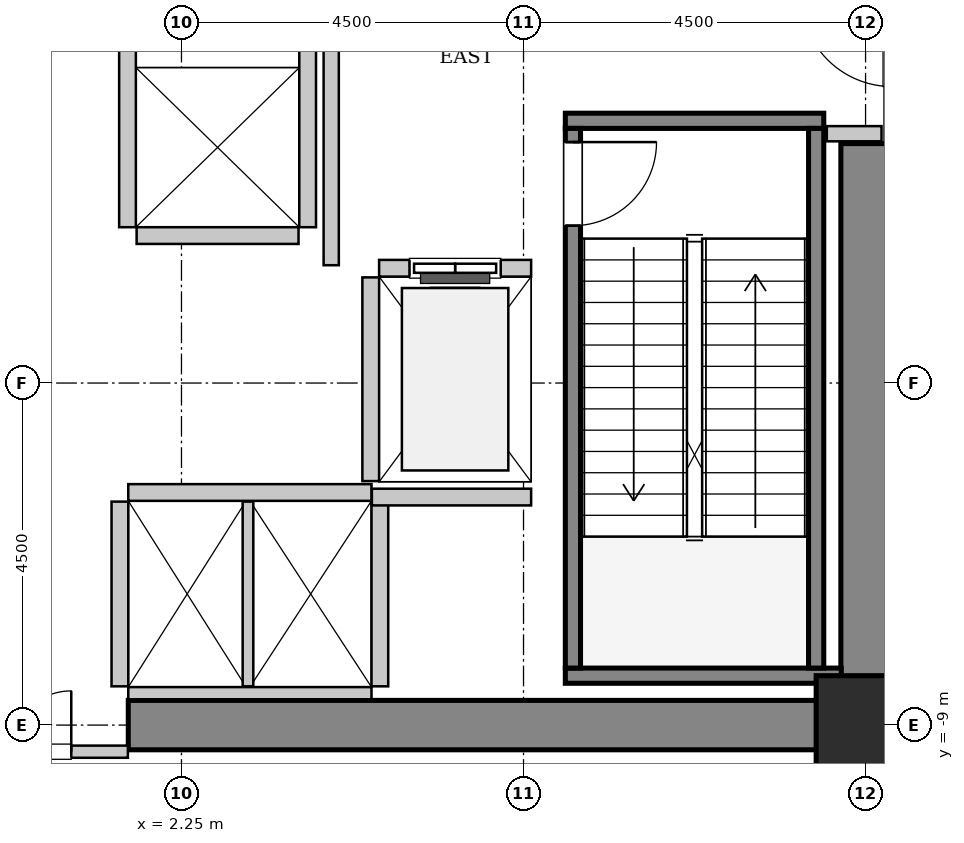
"""IFC4 building model, lengths in metres.
Left out: names, types, materials, properties, quantities, classifications, styles, units other than length and angle.
Written with IfcOpenShell. Run it as: python <this file> out.ifc"""

import sys

from ifc_helpers import new_model, si_unit, direction, frame, frame_2d, origin, origin_2d, place, context, subcontext, project, spatial, rectangle, hollow_rectangle, extrude, source, transform, mapped, element, fill, save


model = new_model("IFC4")
c1 = context("Model", 3, precision=1e-05, world=origin(), true_north=direction((0.0, 1.0)))
c2 = subcontext(c1, "Body", "Model", "MODEL_VIEW")
j1 = project(units=[si_unit("LENGTHUNIT", "METRE"), si_unit("PLANEANGLEUNIT", "RADIAN")], contexts=[c1])
p1 = place(None, origin())
s1 = spatial("IfcSite", under=j1, at=p1, CompositionType="ELEMENT")
p2 = place(p1, origin())
s2 = spatial("IfcBuilding", under=s1, at=p2, CompositionType="ELEMENT")
p3 = place(p2, frame((0.0, 0.0, 22.2)))
s3 = spatial("IfcBuildingStorey", under=s2, at=p3, CompositionType="ELEMENT", Elevation=22.2)
m1 = source(origin(), c2, "Body", "SweptSolid", [
    extrude(rectangle(XDim=10.025, YDim=0.65, at=frame_2d((5.012, 0.0))), origin(), (0.0, 0.0, 1.0), 5.4),
])
p4 = place(p3, frame((1.55, -9.0, 0.0), z_axis=(0.0, 0.0, 1.0), x_axis=(1.0, 0.0, 0.0)))
e1 = element("IfcWall", 1, at=p4, inside=s3, PredefinedType="SHEAR", context=c2, shape_type="MappedRepresentation", body=[
    mapped(m1, transform((0.0, 0.0, 0.0), x_axis=(1.0, 0.0, 0.0), y_axis=(0.0, 1.0, 0.0), z_axis=(0.0, 0.0, 1.0), scale=1.0)),
])
m2 = source(origin(), c2, "Body", "SweptSolid", [
    extrude(rectangle(XDim=7.325, YDim=0.65, at=frame_2d((3.663, 0.0))), origin(), (0.0, 0.0, 1.0), 5.4),
])
p5 = place(p3, frame((11.25, -8.675, 0.0), z_axis=(0.0, 0.0, 1.0), x_axis=(0.0, 1.0, 0.0)))
e2 = element("IfcWall", 2, at=p5, inside=s3, PredefinedType="SHEAR", context=c2, shape_type="MappedRepresentation", body=[
    mapped(m2, transform((0.0, 0.0, 0.0), x_axis=(1.0, 0.0, 0.0), y_axis=(0.0, 1.0, 0.0), z_axis=(0.0, 0.0, 1.0), scale=1.0)),
])
m3 = source(origin(), c2, "Body", "SweptSolid", [
    extrude(hollow_rectangle(XDim=1.3, YDim=1.3, WallThickness=0.065, InnerFilletRadius=0.065, OuterFilletRadius=0.13, at=origin_2d()), origin(), (0.0, 0.0, 1.0), 5.4),
])
p6 = place(p3, frame((11.25, -9.0, 0.0), z_axis=(0.0, 0.0, 1.0), x_axis=(1.0, 0.0, 0.0)))
e3 = element("IfcColumn", 3, at=p6, inside=s3, PredefinedType="COLUMN", context=c2, shape_type="MappedRepresentation", body=[
    mapped(m3, transform((0.0, 0.0, 0.0), x_axis=(1.0, 0.0, 0.0), y_axis=(0.0, 1.0, 0.0), z_axis=(0.0, 0.0, 1.0), scale=1.0)),
])
m4 = source(origin(), c2, "Body", "SweptSolid", [
    extrude(rectangle(XDim=3.4, YDim=0.2, at=frame_2d((1.7, 0.0))), origin(), (0.0, 0.0, 1.0), 5.4),
])
p7 = place(p3, frame((7.3, -1.05, 0.0), z_axis=(0.0, 0.0, 1.0), x_axis=(1.0, 0.0, 0.0)))
e4 = element("IfcWall", 4, at=p7, inside=s3, PredefinedType="SOLIDWALL", context=c2, shape_type="MappedRepresentation", body=[
    mapped(m4, transform((0.0, 0.0, 0.0), x_axis=(1.0, 0.0, 0.0), y_axis=(0.0, 1.0, 0.0), z_axis=(0.0, 0.0, 1.0), scale=1.0)),
])
m5 = source(origin(), c2, "Body", "SweptSolid", [
    extrude(rectangle(XDim=3.63, YDim=0.2, at=frame_2d((1.815, 0.0))), origin(), (0.0, 0.0, 1.0), 5.4),
])
p8 = place(p3, frame((7.3, -8.35, 0.0), z_axis=(0.0, 0.0, 1.0), x_axis=(1.0, 0.0, 0.0)))
e5 = element("IfcWall", 5, at=p8, inside=s3, PredefinedType="SOLIDWALL", context=c2, shape_type="MappedRepresentation", body=[
    mapped(m5, transform((0.0, 0.0, 0.0), x_axis=(1.0, 0.0, 0.0), y_axis=(0.0, 1.0, 0.0), z_axis=(0.0, 0.0, 1.0), scale=1.0)),
])
m6 = source(origin(), c2, "Body", "SweptSolid", [
    extrude(rectangle(XDim=7.1, YDim=0.2, at=frame_2d((3.55, 0.0))), origin(), (0.0, 0.0, 1.0), 5.4),
])
p9 = place(p3, frame((7.4, -1.15, 0.0), z_axis=(0.0, 0.0, 1.0), x_axis=(0.0, -1.0, 0.0)))
e6 = element("IfcWall", 6, at=p9, inside=s3, PredefinedType="SOLIDWALL", context=c2, shape_type="MappedRepresentation", body=[
    mapped(m6, transform((0.0, 0.0, 0.0), x_axis=(1.0, 0.0, 0.0), y_axis=(0.0, 1.0, 0.0), z_axis=(0.0, 0.0, 1.0), scale=1.0)),
])
p10 = place(p9, frame((0.18, 0.0, 0.0)))
e7 = element("IfcOpeningElement", 7, at=p10, cuts=e6, PredefinedType="OPENING", context=c2, shape_type="SweptSolid", body=[
    extrude(rectangle(XDim=1.1, YDim=2.15, at=frame_2d((0.55, 1.075))), frame((0.0, 0.11, 0.0), z_axis=(0.0, -1.0, 0.0), x_axis=(1.0, 0.0, 0.0)), (0.0, 0.0, 1.0), 0.22),
])
p11 = place(p3, frame((10.6, -1.15, 0.0), z_axis=(0.0, 0.0, 1.0), x_axis=(0.0, -1.0, 0.0)))
e8 = element("IfcWall", 8, at=p11, inside=s3, PredefinedType="SOLIDWALL", context=c2, shape_type="MappedRepresentation", body=[
    mapped(m6, transform((0.0, 0.0, 0.0), x_axis=(1.0, 0.0, 0.0), y_axis=(0.0, 1.0, 0.0), z_axis=(0.0, 0.0, 1.0), scale=1.0)),
])
m7 = source(origin(), c2, "Body", "SweptSolid", [
    extrude(rectangle(XDim=2.0, YDim=0.22, at=frame_2d((1.0, 0.0))), origin(), (0.0, 0.0, 1.0), 4.905),
])
p12 = place(p3, frame((6.85, -2.99, 0.0), z_axis=(0.0, 0.0, 1.0), x_axis=(-1.0, 0.0, 0.0)))
e9 = element("IfcWall", 9, at=p12, inside=s3, PredefinedType="SOLIDWALL", context=c2, shape_type="MappedRepresentation", body=[
    mapped(m7, transform((0.0, 0.0, 0.0), x_axis=(1.0, 0.0, 0.0), y_axis=(0.0, 1.0, 0.0), z_axis=(0.0, 0.0, 1.0), scale=1.0)),
])
p13 = place(p12, frame((0.4, 0.0, 0.0)))
e10 = element("IfcOpeningElement", 10, at=p13, cuts=e9, PredefinedType="OPENING", context=c2, shape_type="SweptSolid", body=[
    extrude(rectangle(XDim=1.2, YDim=2.2, at=frame_2d((0.6, 1.1))), frame((0.0, 0.12, 0.0), z_axis=(0.0, -1.0, 0.0), x_axis=(1.0, 0.0, 0.0)), (0.0, 0.0, 1.0), 0.24),
])
m8 = source(origin(), c2, "Body", "SweptSolid", [
    extrude(rectangle(XDim=2.68, YDim=0.22, at=frame_2d((1.34, 0.0))), origin(), (0.0, 0.0, 1.0), 4.905),
])
p14 = place(p3, frame((4.74, -3.11, 0.0), z_axis=(0.0, 0.0, 1.0), x_axis=(0.0, -1.0, 0.0)))
e11 = element("IfcWall", 11, at=p14, inside=s3, PredefinedType="SOLIDWALL", context=c2, shape_type="MappedRepresentation", body=[
    mapped(m8, transform((0.0, 0.0, 0.0), x_axis=(1.0, 0.0, 0.0), y_axis=(0.0, 1.0, 0.0), z_axis=(0.0, 0.0, 1.0), scale=1.0)),
])
m9 = source(origin(), c2, "Body", "SweptSolid", [
    extrude(rectangle(XDim=3.2, YDim=0.22, at=frame_2d((1.6, 0.0))), origin(), (0.0, 0.0, 1.0), 4.905),
])
p15 = place(p3, frame((4.75, -5.94, 0.0), z_axis=(0.0, 0.0, 1.0), x_axis=(-1.0, 0.0, 0.0)))
e12 = element("IfcWall", 12, at=p15, inside=s3, PredefinedType="SOLIDWALL", context=c2, shape_type="MappedRepresentation", body=[
    mapped(m9, transform((0.0, 0.0, 0.0), x_axis=(1.0, 0.0, 0.0), y_axis=(0.0, 1.0, 0.0), z_axis=(0.0, 0.0, 1.0), scale=1.0)),
])
m10 = source(origin(), c2, "Body", "SweptSolid", [
    extrude(rectangle(XDim=3.2, YDim=0.16, at=frame_2d((1.6, 0.0))), origin(), (0.0, 0.0, 1.0), 3.795),
])
p16 = place(p3, frame((1.55, -8.58, 0.0), z_axis=(0.0, 0.0, 1.0), x_axis=(1.0, 0.0, 0.0)))
e13 = element("IfcWall", 13, at=p16, inside=s3, PredefinedType="PARTITIONING", context=c2, shape_type="MappedRepresentation", body=[
    mapped(m10, transform((0.0, 0.0, 0.0), x_axis=(1.0, 0.0, 0.0), y_axis=(0.0, 1.0, 0.0), z_axis=(0.0, 0.0, 1.0), scale=1.0)),
])
m11 = source(origin(), c2, "Body", "SweptSolid", [
    extrude(rectangle(XDim=2.43, YDim=0.22, at=frame_2d((1.215, 0.0))), origin(), (0.0, 0.0, 1.0), 4.905),
])
p17 = place(p3, frame((1.44, -6.06, 0.0), z_axis=(0.0, 0.0, 1.0), x_axis=(0.0, -1.0, 0.0)))
e14 = element("IfcWall", 14, at=p17, inside=s3, PredefinedType="SOLIDWALL", context=c2, shape_type="MappedRepresentation", body=[
    mapped(m11, transform((0.0, 0.0, 0.0), x_axis=(1.0, 0.0, 0.0), y_axis=(0.0, 1.0, 0.0), z_axis=(0.0, 0.0, 1.0), scale=1.0)),
])
m12 = source(origin(), c2, "Body", "SweptSolid", [
    extrude(rectangle(XDim=2.43, YDim=0.14, at=frame_2d((1.215, 0.0))), origin(), (0.0, 0.0, 1.0), 4.905),
])
p18 = place(p3, frame((3.125, -8.49, 0.0), z_axis=(0.0, 0.0, 1.0), x_axis=(0.0, 1.0, 0.0)))
e15 = element("IfcWall", 15, at=p18, inside=s3, PredefinedType="PARTITIONING", context=c2, shape_type="MappedRepresentation", body=[
    mapped(m12, transform((0.0, 0.0, 0.0), x_axis=(1.0, 0.0, 0.0), y_axis=(0.0, 1.0, 0.0), z_axis=(0.0, 0.0, 1.0), scale=1.0)),
])
p19 = place(p3, frame((4.86, -8.49, 0.0), z_axis=(0.0, 0.0, 1.0), x_axis=(0.0, 1.0, 0.0)))
e16 = element("IfcWall", 16, at=p19, inside=s3, PredefinedType="SOLIDWALL", context=c2, shape_type="MappedRepresentation", body=[
    mapped(m11, transform((0.0, 0.0, 0.0), x_axis=(1.0, 0.0, 0.0), y_axis=(0.0, 1.0, 0.0), z_axis=(0.0, 0.0, 1.0), scale=1.0)),
])
m13 = source(origin(), c2, "Body", "SweptSolid", [
    extrude(rectangle(XDim=4.9, YDim=0.22, at=frame_2d((2.45, 0.0))), origin(), (0.0, 0.0, 1.0), 4.905),
])
for number, where, z_axis, x_axis in (
    (17, (1.54, 2.45, 0.0), (0.0, 0.0, 1.0), (0.0, -1.0, 0.0)),
    (18, (3.91, -2.45, 0.0), (0.0, 0.0, 1.0), (0.0, 1.0, 0.0)),
):
    element("IfcWall", number, at=place(p3, frame(where, z_axis=z_axis, x_axis=x_axis)), inside=s3, PredefinedType="SOLIDWALL", context=c2, shape_type="MappedRepresentation", body=[
        mapped(m13, transform((0.0, 0.0, 0.0), x_axis=(1.0, 0.0, 0.0), y_axis=(0.0, 1.0, 0.0), z_axis=(0.0, 0.0, 1.0), scale=1.0)),
    ])
m14 = source(origin(), c2, "Body", "SweptSolid", [
    extrude(rectangle(XDim=2.13, YDim=0.22, at=frame_2d((1.065, 0.0))), origin(), (0.0, 0.0, 1.0), 4.905),
])
p20 = place(p3, frame((1.66, -2.56, 0.0), z_axis=(0.0, 0.0, 1.0), x_axis=(1.0, 0.0, 0.0)))
e19 = element("IfcWall", 19, at=p20, inside=s3, PredefinedType="SOLIDWALL", context=c2, shape_type="MappedRepresentation", body=[
    mapped(m14, transform((0.0, 0.0, 0.0), x_axis=(1.0, 0.0, 0.0), y_axis=(0.0, 1.0, 0.0), z_axis=(0.0, 0.0, 1.0), scale=1.0)),
])
m15 = source(origin(), c2, "Body", "SweptSolid", [
    extrude(rectangle(XDim=2.095, YDim=0.22, at=frame_2d((1.048, 0.0))), origin(), (0.0, 0.0, 1.0), 4.905),
])
p21 = place(p3, frame((4.755, -6.0, 0.0), z_axis=(0.0, 0.0, 1.0), x_axis=(1.0, 0.0, 0.0)))
e20 = element("IfcWall", 20, at=p21, inside=s3, PredefinedType="SOLIDWALL", context=c2, shape_type="MappedRepresentation", body=[
    mapped(m15, transform((0.0, 0.0, 0.0), x_axis=(1.0, 0.0, 0.0), y_axis=(0.0, 1.0, 0.0), z_axis=(0.0, 0.0, 1.0), scale=1.0)),
])
m16 = source(origin(), c2, "Body", "SweptSolid", [
    extrude(rectangle(XDim=5.9, YDim=0.2, at=frame_2d((2.95, 0.0))), origin(), (0.0, 0.0, 1.0), 4.905),
])
p22 = place(p3, frame((4.22, -2.95, 0.0), z_axis=(0.0, 0.0, 1.0), x_axis=(0.0, 1.0, 0.0)))
e21 = element("IfcWall", 21, at=p22, inside=s3, PredefinedType="PARTITIONING", context=c2, shape_type="MappedRepresentation", body=[
    mapped(m16, transform((0.0, 0.0, 0.0), x_axis=(1.0, 0.0, 0.0), y_axis=(0.0, 1.0, 0.0), z_axis=(0.0, 0.0, 1.0), scale=1.0)),
])
m17 = source(origin(), c2, "Body", "SweptSolid", [
    extrude(rectangle(XDim=0.72, YDim=0.2, at=frame_2d((0.36, 0.0))), origin(), (0.0, 0.0, 1.0), 4.905),
])
p23 = place(p3, frame((10.74, -1.22, 0.0), z_axis=(0.0, 0.0, 1.0), x_axis=(1.0, 0.0, 0.0)))
e22 = element("IfcWall", 22, at=p23, inside=s3, PredefinedType="PARTITIONING", context=c2, shape_type="MappedRepresentation", body=[
    mapped(m17, transform((0.0, 0.0, 0.0), x_axis=(1.0, 0.0, 0.0), y_axis=(0.0, 1.0, 0.0), z_axis=(0.0, 0.0, 1.0), scale=1.0)),
])
m18 = source(origin(), c2, "Body", "SweptSolid", [
    extrude(rectangle(XDim=3.09, YDim=0.16, at=frame_2d((1.545, 0.0))), origin(), (0.0, 0.0, 1.0), 3.795),
])
p24 = place(p3, frame((-1.545, -9.35, 0.0), z_axis=(0.0, 0.0, 1.0), x_axis=(1.0, 0.0, 0.0)))
e23 = element("IfcWall", 23, at=p24, inside=s3, PredefinedType="PARTITIONING", context=c2, shape_type="MappedRepresentation", body=[
    mapped(m18, transform((0.0, 0.0, 0.0), x_axis=(1.0, 0.0, 0.0), y_axis=(0.0, 1.0, 0.0), z_axis=(0.0, 0.0, 1.0), scale=1.0)),
])
p25 = place(p24, frame((0.745, 0.0, 0.0)))
e24 = element("IfcOpeningElement", 24, at=p25, cuts=e23, PredefinedType="OPENING", context=c2, shape_type="SweptSolid", body=[
    extrude(rectangle(XDim=1.6, YDim=2.3, at=frame_2d((0.8, 1.15))), frame((0.0, 0.09, 0.0), z_axis=(0.0, -1.0, 0.0), x_axis=(1.0, 0.0, 0.0)), (0.0, 0.0, 1.0), 0.18),
])
m19 = source(origin(), c2, "Body", "SweptSolid", [
    extrude(rectangle(XDim=1.1, YDim=2.15, at=frame_2d((0.55, 1.075))), frame((0.0, 0.025, 0.0), z_axis=(0.0, -1.0, 0.0), x_axis=(1.0, 0.0, 0.0)), (0.0, 0.0, 1.0), 0.05),
])
p26 = place(p10, origin())
e25 = element("IfcDoor", 25, at=p26, inside=s3, OperationType="SINGLE_SWING_LEFT", PredefinedType="DOOR", context=c2, shape_type="MappedRepresentation", body=[
    mapped(m19, transform((0.0, 0.0, 0.0), x_axis=(1.0, 0.0, 0.0), y_axis=(0.0, 1.0, 0.0), z_axis=(0.0, 0.0, 1.0), scale=1.0)),
])
fill(e7, e25)
m20 = source(origin(), c2, "Body", "SweptSolid", [
    extrude(rectangle(XDim=1.2, YDim=2.2, at=frame_2d((0.6, 1.1))), frame((0.0, 0.025, 0.0), z_axis=(0.0, -1.0, 0.0), x_axis=(1.0, 0.0, 0.0)), (0.0, 0.0, 1.0), 0.05),
])
p27 = place(p13, origin())
e26 = element("IfcDoor", 26, at=p27, inside=s3, OperationType="SLIDING_TO_LEFT", PredefinedType="DOOR", context=c2, shape_type="MappedRepresentation", body=[
    mapped(m20, transform((0.0, 0.0, 0.0), x_axis=(1.0, 0.0, 0.0), y_axis=(0.0, 1.0, 0.0), z_axis=(0.0, 0.0, 1.0), scale=1.0)),
])
fill(e10, e26)
m21 = source(origin(), c2, "Body", "SweptSolid", [
    extrude(rectangle(XDim=1.6, YDim=2.3, at=frame_2d((0.8, 1.15))), frame((0.0, 0.025, 0.0), z_axis=(0.0, -1.0, 0.0), x_axis=(1.0, 0.0, 0.0)), (0.0, 0.0, 1.0), 0.05),
])
p28 = place(p25, origin())
e27 = element("IfcDoor", 27, at=p28, inside=s3, OperationType="DOUBLE_DOOR_SINGLE_SWING", PredefinedType="DOOR", context=c2, shape_type="MappedRepresentation", body=[
    mapped(m21, transform((0.0, 0.0, 0.0), x_axis=(1.0, 0.0, 0.0), y_axis=(0.0, 1.0, 0.0), z_axis=(0.0, 0.0, 1.0), scale=1.0)),
])
fill(e24, e27)
save(model, sys.argv[1])
